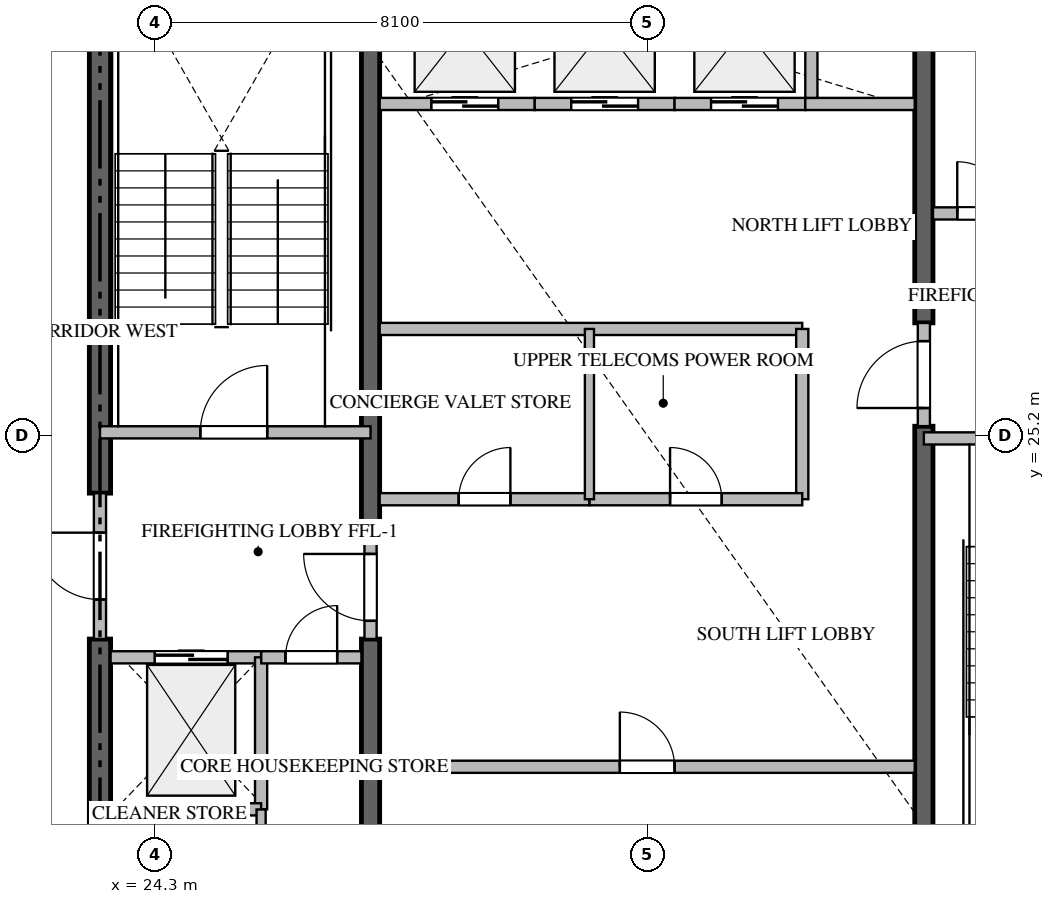
"""IFC4 building model, lengths in metres.
Left out: names, types, materials, properties, quantities, classifications, styles, units other than length and angle.
Written with IfcOpenShell. Run it as: python <this file> out.ifc"""

import sys

from ifc_helpers import new_model, si_unit, direction, frame, frame_2d, origin, place, context, subcontext, project, spatial, rectangle, extrude, source, transform, mapped, element, fill, save


model = new_model("IFC4")
c1 = context("Model", 3, precision=1e-05, world=origin(), true_north=direction((0.0, 1.0)))
c2 = subcontext(c1, "Body", "Model", "MODEL_VIEW")
j1 = project(units=[si_unit("LENGTHUNIT", "METRE"), si_unit("PLANEANGLEUNIT", "RADIAN")], contexts=[c1])
p1 = place(None, origin())
s1 = spatial("IfcSite", under=j1, at=p1, CompositionType="ELEMENT")
p2 = place(p1, origin())
s2 = spatial("IfcBuilding", under=s1, at=p2, CompositionType="ELEMENT")
p3 = place(p2, frame((0.0, 0.0, 264.35)))
s3 = spatial("IfcBuildingStorey", under=s2, at=p3, CompositionType="ELEMENT", Elevation=264.35)
p4 = place(p3, frame((23.4, 16.975, -0.26), z_axis=(0.0, 0.0, 1.0), x_axis=(0.0, 1.0, 0.0)))
e1 = element("IfcWall", 1, at=p4, inside=s3, PredefinedType="SHEAR", context=c2, shape_type="SweptSolid", body=[
    extrude(rectangle(XDim=4.875, YDim=0.35, at=frame_2d((2.438, 0.0))), origin(), (0.0, 0.0, 1.0), 3.848),
])
p5 = place(p3, frame((23.4, 24.25, -0.26), z_axis=(0.0, 0.0, 1.0), x_axis=(0.0, 1.0, 0.0)))
e2 = element("IfcWall", 2, at=p5, inside=s3, PredefinedType="SHEAR", context=c2, shape_type="SweptSolid", body=[
    extrude(rectangle(XDim=9.175, YDim=0.35, at=frame_2d((4.587, 0.0))), origin(), (0.0, 0.0, 1.0), 3.848),
])
p6 = place(p3, frame((27.85, 16.975, -0.26), z_axis=(0.0, 0.0, 1.0), x_axis=(0.0, 1.0, 0.0)))
e3 = element("IfcWall", 3, at=p6, inside=s3, PredefinedType="SHEAR", context=c2, shape_type="SweptSolid", body=[
    extrude(rectangle(XDim=4.875, YDim=0.3, at=frame_2d((2.438, 0.0))), origin(), (0.0, 0.0, 1.0), 3.848),
])
p7 = place(p3, frame((27.85, 23.55, -0.26), z_axis=(0.0, 0.0, 1.0), x_axis=(0.0, 1.0, 0.0)))
e4 = element("IfcWall", 4, at=p7, inside=s3, PredefinedType="SHEAR", context=c2, shape_type="SweptSolid", body=[
    extrude(rectangle(XDim=9.875, YDim=0.3, at=frame_2d((4.938, 0.0))), origin(), (0.0, 0.0, 1.0), 3.848),
])
p8 = place(p3, frame((36.95, 16.975, -0.26), z_axis=(0.0, 0.0, 1.0), x_axis=(0.0, 1.0, 0.0)))
e5 = element("IfcWall", 5, at=p8, inside=s3, PredefinedType="SHEAR", context=c2, shape_type="SweptSolid", body=[
    extrude(rectangle(XDim=8.375, YDim=0.3, at=frame_2d((4.188, 0.0))), origin(), (0.0, 0.0, 1.0), 3.848),
])
p9 = place(p3, frame((36.95, 27.05, -0.26), z_axis=(0.0, 0.0, 1.0), x_axis=(0.0, 1.0, 0.0)))
e6 = element("IfcWall", 6, at=p9, inside=s3, PredefinedType="SHEAR", context=c2, shape_type="SweptSolid", body=[
    extrude(rectangle(XDim=6.375, YDim=0.3, at=frame_2d((3.188, 0.0))), origin(), (0.0, 0.0, 1.0), 3.848),
])
p10 = place(p3, frame((23.4, 25.25, 0.0), z_axis=(0.0, 0.0, 1.0), x_axis=(1.0, 0.0, 0.0)))
e7 = element("IfcWall", 7, at=p10, inside=s3, PredefinedType="STANDARD", context=c2, shape_type="SweptSolid", body=[
    extrude(rectangle(XDim=4.45, YDim=0.2, at=frame_2d((2.225, 0.0))), origin(), (0.0, 0.0, 1.0), 3.59),
])
p11 = place(p10, frame((1.65, 0.0, 0.0)))
e8 = element("IfcOpeningElement", 8, at=p11, cuts=e7, PredefinedType="OPENING", context=c2, shape_type="SweptSolid", body=[
    extrude(rectangle(XDim=1.1, YDim=2.15, at=frame_2d((0.55, 1.075))), frame((0.0, 0.11, 0.0), z_axis=(0.0, -1.0, 0.0), x_axis=(1.0, 0.0, 0.0)), (0.0, 0.0, 1.0), 0.22),
])
p12 = place(p3, frame((36.95, 25.15, 0.0), z_axis=(0.0, 0.0, 1.0), x_axis=(1.0, 0.0, 0.0)))
e9 = element("IfcWall", 9, at=p12, inside=s3, PredefinedType="STANDARD", context=c2, shape_type="SweptSolid", body=[
    extrude(rectangle(XDim=4.45, YDim=0.2, at=frame_2d((2.225, 0.0))), origin(), (0.0, 0.0, 1.0), 3.59),
])
p13 = place(p12, frame((1.65, 0.0, 0.0)))
e10 = element("IfcOpeningElement", 10, at=p13, cuts=e9, PredefinedType="OPENING", context=c2, shape_type="SweptSolid", body=[
    extrude(rectangle(XDim=1.1, YDim=2.15, at=frame_2d((0.55, 1.075))), frame((0.0, 0.11, 0.0), z_axis=(0.0, -1.0, 0.0), x_axis=(1.0, 0.0, 0.0)), (0.0, 0.0, 1.0), 0.22),
])
p14 = place(p3, frame((23.575, 21.55, 0.0), z_axis=(0.0, 0.0, 1.0), x_axis=(1.0, 0.0, 0.0)))
e11 = element("IfcWall", 11, at=p14, inside=s3, PredefinedType="STANDARD", context=c2, shape_type="SweptSolid", body=[
    extrude(rectangle(XDim=2.475, YDim=0.2, at=frame_2d((1.238, 0.0))), origin(), (0.0, 0.0, 1.0), 3.59),
])
p15 = place(p14, frame((0.725, 0.0, 0.0)))
e12 = element("IfcOpeningElement", 12, at=p15, cuts=e11, PredefinedType="OPENING", context=c2, shape_type="SweptSolid", body=[
    extrude(rectangle(XDim=1.2, YDim=2.2, at=frame_2d((0.6, 1.1))), frame((0.0, 0.11, 0.0), z_axis=(0.0, -1.0, 0.0), x_axis=(1.0, 0.0, 0.0)), (0.0, 0.0, 1.0), 0.22),
])
p16 = place(p3, frame((28.0, 30.65, 0.0), z_axis=(0.0, 0.0, 1.0), x_axis=(1.0, 0.0, 0.0)))
e13 = element("IfcWall", 13, at=p16, inside=s3, PredefinedType="STANDARD", context=c2, shape_type="SweptSolid", body=[
    extrude(rectangle(XDim=2.55, YDim=0.2, at=frame_2d((1.275, 0.0))), origin(), (0.0, 0.0, 1.0), 3.59),
])
p17 = place(p16, frame((0.85, 0.0, 0.0)))
e14 = element("IfcOpeningElement", 14, at=p17, cuts=e13, PredefinedType="OPENING", context=c2, shape_type="SweptSolid", body=[
    extrude(rectangle(XDim=1.1, YDim=2.2, at=frame_2d((0.55, 1.1))), frame((0.0, 0.11, 0.0), z_axis=(0.0, -1.0, 0.0), x_axis=(1.0, 0.0, 0.0)), (0.0, 0.0, 1.0), 0.22),
])
p18 = place(p3, frame((30.55, 30.65, 0.0), z_axis=(0.0, 0.0, 1.0), x_axis=(1.0, 0.0, 0.0)))
e15 = element("IfcWall", 15, at=p18, inside=s3, PredefinedType="STANDARD", context=c2, shape_type="SweptSolid", body=[
    extrude(rectangle(XDim=2.3, YDim=0.2, at=frame_2d((1.15, 0.0))), origin(), (0.0, 0.0, 1.0), 3.59),
])
p19 = place(p18, frame((0.6, 0.0, 0.0)))
e16 = element("IfcOpeningElement", 16, at=p19, cuts=e15, PredefinedType="OPENING", context=c2, shape_type="SweptSolid", body=[
    extrude(rectangle(XDim=1.1, YDim=2.2, at=frame_2d((0.55, 1.1))), frame((0.0, 0.11, 0.0), z_axis=(0.0, -1.0, 0.0), x_axis=(1.0, 0.0, 0.0)), (0.0, 0.0, 1.0), 0.22),
])
p20 = place(p3, frame((32.85, 30.65, 0.0), z_axis=(0.0, 0.0, 1.0), x_axis=(1.0, 0.0, 0.0)))
e17 = element("IfcWall", 17, at=p20, inside=s3, PredefinedType="STANDARD", context=c2, shape_type="SweptSolid", body=[
    extrude(rectangle(XDim=2.15, YDim=0.2, at=frame_2d((1.075, 0.0))), origin(), (0.0, 0.0, 1.0), 3.59),
])
p21 = place(p20, frame((0.6, 0.0, 0.0)))
e18 = element("IfcOpeningElement", 18, at=p21, cuts=e17, PredefinedType="OPENING", context=c2, shape_type="SweptSolid", body=[
    extrude(rectangle(XDim=1.1, YDim=2.2, at=frame_2d((0.55, 1.1))), frame((0.0, 0.11, 0.0), z_axis=(0.0, -1.0, 0.0), x_axis=(1.0, 0.0, 0.0)), (0.0, 0.0, 1.0), 0.22),
])
p22 = place(p3, frame((35.0, 30.65, 0.0), z_axis=(0.0, 0.0, 1.0), x_axis=(1.0, 0.0, 0.0)))
e19 = element("IfcWall", 19, at=p22, inside=s3, PredefinedType="STANDARD", context=c2, shape_type="SweptSolid", body=[
    extrude(rectangle(XDim=1.8, YDim=0.2, at=frame_2d((0.9, 0.0))), origin(), (0.0, 0.0, 1.0), 3.59),
])
p23 = place(p3, frame((35.1, 30.75, 0.0), z_axis=(0.0, 0.0, 1.0), x_axis=(0.0, 1.0, 0.0)))
e20 = element("IfcWall", 20, at=p23, inside=s3, PredefinedType="STANDARD", context=c2, shape_type="SweptSolid", body=[
    extrude(rectangle(XDim=2.675, YDim=0.2, at=frame_2d((1.337, 0.0))), origin(), (0.0, 0.0, 1.0), 3.59),
])
p24 = place(p3, frame((26.05, 19.05, 0.0), z_axis=(0.0, 0.0, 1.0), x_axis=(0.0, 1.0, 0.0)))
e21 = element("IfcWall", 21, at=p24, inside=s3, PredefinedType="STANDARD", context=c2, shape_type="SweptSolid", body=[
    extrude(rectangle(XDim=2.5, YDim=0.2, at=frame_2d((1.25, 0.0))), origin(), (0.0, 0.0, 1.0), 3.59),
])
p25 = place(p3, frame((23.575, 19.05, 0.0), z_axis=(0.0, 0.0, 1.0), x_axis=(1.0, 0.0, 0.0)))
e22 = element("IfcWall", 22, at=p25, inside=s3, PredefinedType="STANDARD", context=c2, shape_type="SweptSolid", body=[
    extrude(rectangle(XDim=2.475, YDim=0.2, at=frame_2d((1.238, 0.0))), origin(), (0.0, 0.0, 1.0), 3.59),
])
p26 = place(p3, frame((26.052, 21.55, 0.0), z_axis=(0.0, 0.0, 1.0), x_axis=(1.0, 0.0, 0.0)))
e23 = element("IfcWall", 23, at=p26, inside=s3, PredefinedType="STANDARD", context=c2, shape_type="SweptSolid", body=[
    extrude(rectangle(XDim=1.648, YDim=0.2, at=frame_2d((0.824, 0.0))), origin(), (0.0, 0.0, 1.0), 3.59),
])
p27 = place(p26, frame((0.399, 0.0, 0.0)))
e24 = element("IfcOpeningElement", 24, at=p27, cuts=e23, PredefinedType="OPENING", context=c2, shape_type="SweptSolid", body=[
    extrude(rectangle(XDim=0.85, YDim=2.1, at=frame_2d((0.425, 1.05))), frame((0.0, 0.11, 0.0), z_axis=(0.0, -1.0, 0.0), x_axis=(1.0, 0.0, 0.0)), (0.0, 0.0, 1.0), 0.22),
])
p28 = place(p3, frame((37.1, 28.85, 0.0), z_axis=(0.0, 0.0, 1.0), x_axis=(1.0, 0.0, 0.0)))
e25 = element("IfcWall", 25, at=p28, inside=s3, PredefinedType="STANDARD", context=c2, shape_type="SweptSolid", body=[
    extrude(rectangle(XDim=1.648, YDim=0.2, at=frame_2d((0.824, 0.0))), origin(), (0.0, 0.0, 1.0), 3.59),
])
p29 = place(p28, frame((0.399, 0.0, 0.0)))
e26 = element("IfcOpeningElement", 26, at=p29, cuts=e25, PredefinedType="OPENING", context=c2, shape_type="SweptSolid", body=[
    extrude(rectangle(XDim=0.85, YDim=2.1, at=frame_2d((0.425, 1.05))), frame((0.0, 0.11, 0.0), z_axis=(0.0, -1.0, 0.0), x_axis=(1.0, 0.0, 0.0)), (0.0, 0.0, 1.0), 0.22),
])
p30 = place(p3, frame((23.4, 21.852, 0.0), z_axis=(0.0, 0.0, 1.0), x_axis=(0.0, 1.0, 0.0)))
e27 = element("IfcWall", 27, at=p30, inside=s3, PredefinedType="STANDARD", context=c2, shape_type="SweptSolid", body=[
    extrude(rectangle(XDim=2.396, YDim=0.2, at=frame_2d((1.198, 0.0))), origin(), (0.0, 0.0, 1.0), 3.59),
])
p31 = place(p30, frame((0.648, 0.0, 0.0)))
e28 = element("IfcOpeningElement", 28, at=p31, cuts=e27, PredefinedType="OPENING", context=c2, shape_type="SweptSolid", body=[
    extrude(rectangle(XDim=1.1, YDim=2.15, at=frame_2d((0.55, 1.075))), frame((0.0, 0.11, 0.0), z_axis=(0.0, -1.0, 0.0), x_axis=(1.0, 0.0, 0.0)), (0.0, 0.0, 1.0), 0.22),
])
p32 = place(p3, frame((27.85, 21.852, 0.0), z_axis=(0.0, 0.0, 1.0), x_axis=(0.0, 1.0, 0.0)))
e29 = element("IfcWall", 29, at=p32, inside=s3, PredefinedType="STANDARD", context=c2, shape_type="SweptSolid", body=[
    extrude(rectangle(XDim=1.696, YDim=0.2, at=frame_2d((0.848, 0.0))), origin(), (0.0, 0.0, 1.0), 3.59),
])
p33 = place(p32, frame((0.298, 0.0, 0.0)))
e30 = element("IfcOpeningElement", 30, at=p33, cuts=e29, PredefinedType="OPENING", context=c2, shape_type="SweptSolid", body=[
    extrude(rectangle(XDim=1.1, YDim=2.15, at=frame_2d((0.55, 1.075))), frame((0.0, 0.11, 0.0), z_axis=(0.0, -1.0, 0.0), x_axis=(1.0, 0.0, 0.0)), (0.0, 0.0, 1.0), 0.22),
])
p34 = place(p3, frame((36.95, 25.352, 0.0), z_axis=(0.0, 0.0, 1.0), x_axis=(0.0, 1.0, 0.0)))
e31 = element("IfcWall", 31, at=p34, inside=s3, PredefinedType="STANDARD", context=c2, shape_type="SweptSolid", body=[
    extrude(rectangle(XDim=1.696, YDim=0.2, at=frame_2d((0.848, 0.0))), origin(), (0.0, 0.0, 1.0), 3.59),
])
p35 = place(p34, frame((0.298, 0.0, 0.0)))
e32 = element("IfcOpeningElement", 32, at=p35, cuts=e31, PredefinedType="OPENING", context=c2, shape_type="SweptSolid", body=[
    extrude(rectangle(XDim=1.1, YDim=2.15, at=frame_2d((0.55, 1.075))), frame((0.0, 0.11, 0.0), z_axis=(0.0, -1.0, 0.0), x_axis=(1.0, 0.0, 0.0)), (0.0, 0.0, 1.0), 0.22),
])
p36 = place(p3, frame((26.05, 16.975, 0.0), z_axis=(0.0, 0.0, 1.0), x_axis=(0.0, 1.0, 0.0)))
e33 = element("IfcWall", 33, at=p36, inside=s3, PredefinedType="PARTITIONING", context=c2, shape_type="SweptSolid", body=[
    extrude(rectangle(XDim=2.073, YDim=0.15, at=frame_2d((1.037, 0.0))), origin(), (0.0, 0.0, 1.0), 3.59),
])
p37 = place(p36, frame((0.611, 0.0, 0.0)))
e34 = element("IfcOpeningElement", 34, at=p37, cuts=e33, PredefinedType="OPENING", context=c2, shape_type="SweptSolid", body=[
    extrude(rectangle(XDim=0.85, YDim=2.1, at=frame_2d((0.425, 1.05))), frame((0.0, 0.085, 0.0), z_axis=(0.0, -1.0, 0.0), x_axis=(1.0, 0.0, 0.0)), (0.0, 0.0, 1.0), 0.17),
])
p38 = place(p3, frame((28.0, 19.75, 0.0), z_axis=(0.0, 0.0, 1.0), x_axis=(1.0, 0.0, 0.0)))
e35 = element("IfcWall", 35, at=p38, inside=s3, PredefinedType="STANDARD", context=c2, shape_type="SweptSolid", body=[
    extrude(rectangle(XDim=8.8, YDim=0.2, at=frame_2d((4.4, 0.0))), origin(), (0.0, 0.0, 1.0), 3.59),
])
p39 = place(p38, frame((3.95, 0.0, 0.0)))
e36 = element("IfcOpeningElement", 36, at=p39, cuts=e35, PredefinedType="OPENING", context=c2, shape_type="SweptSolid", body=[
    extrude(rectangle(XDim=0.9, YDim=2.1, at=frame_2d((0.45, 1.05))), frame((0.0, 0.11, 0.0), z_axis=(0.0, -1.0, 0.0), x_axis=(1.0, 0.0, 0.0)), (0.0, 0.0, 1.0), 0.22),
])
p40 = place(p3, frame((28.0, 26.95, 0.0), z_axis=(0.0, 0.0, 1.0), x_axis=(1.0, 0.0, 0.0)))
e37 = element("IfcWall", 37, at=p40, inside=s3, PredefinedType="STANDARD", context=c2, shape_type="SweptSolid", body=[
    extrude(rectangle(XDim=6.95, YDim=0.2, at=frame_2d((3.475, 0.0))), origin(), (0.0, 0.0, 1.0), 3.59),
])
p41 = place(p3, frame((34.95, 24.15, 0.0), z_axis=(0.0, 0.0, 1.0), x_axis=(0.0, 1.0, 0.0)))
e38 = element("IfcWall", 38, at=p41, inside=s3, PredefinedType="STANDARD", context=c2, shape_type="SweptSolid", body=[
    extrude(rectangle(XDim=2.8, YDim=0.2, at=frame_2d((1.4, 0.0))), origin(), (0.0, 0.0, 1.0), 3.59),
])
p42 = place(p3, frame((28.0, 24.15, 0.0), z_axis=(0.0, 0.0, 1.0), x_axis=(1.0, 0.0, 0.0)))
e39 = element("IfcWall", 39, at=p42, inside=s3, PredefinedType="STANDARD", context=c2, shape_type="SweptSolid", body=[
    extrude(rectangle(XDim=3.45, YDim=0.2, at=frame_2d((1.725, 0.0))), origin(), (0.0, 0.0, 1.0), 3.59),
])
p43 = place(p42, frame((1.3, 0.0, 0.0)))
e40 = element("IfcOpeningElement", 40, at=p43, cuts=e39, PredefinedType="OPENING", context=c2, shape_type="SweptSolid", body=[
    extrude(rectangle(XDim=0.85, YDim=2.1, at=frame_2d((0.425, 1.05))), frame((0.0, 0.11, 0.0), z_axis=(0.0, -1.0, 0.0), x_axis=(1.0, 0.0, 0.0)), (0.0, 0.0, 1.0), 0.22),
])
p44 = place(p3, frame((31.452, 24.15, 0.0), z_axis=(0.0, 0.0, 1.0), x_axis=(1.0, 0.0, 0.0)))
e41 = element("IfcWall", 41, at=p44, inside=s3, PredefinedType="STANDARD", context=c2, shape_type="SweptSolid", body=[
    extrude(rectangle(XDim=3.498, YDim=0.2, at=frame_2d((1.749, 0.0))), origin(), (0.0, 0.0, 1.0), 3.59),
])
p45 = place(p44, frame((1.324, 0.0, 0.0)))
e42 = element("IfcOpeningElement", 42, at=p45, cuts=e41, PredefinedType="OPENING", context=c2, shape_type="SweptSolid", body=[
    extrude(rectangle(XDim=0.85, YDim=2.1, at=frame_2d((0.425, 1.05))), frame((0.0, 0.11, 0.0), z_axis=(0.0, -1.0, 0.0), x_axis=(1.0, 0.0, 0.0)), (0.0, 0.0, 1.0), 0.22),
])
p46 = place(p3, frame((31.45, 24.15, 0.0), z_axis=(0.0, 0.0, 1.0), x_axis=(0.0, 1.0, 0.0)))
e43 = element("IfcWall", 43, at=p46, inside=s3, PredefinedType="PARTITIONING", context=c2, shape_type="SweptSolid", body=[
    extrude(rectangle(XDim=2.8, YDim=0.15, at=frame_2d((1.4, 0.0))), origin(), (0.0, 0.0, 1.0), 3.59),
])
m1 = source(origin(), c2, "Body", "SweptSolid", [
    extrude(rectangle(XDim=1.1, YDim=2.15, at=frame_2d((0.55, 1.075))), frame((0.0, 0.025, 0.0), z_axis=(0.0, -1.0, 0.0), x_axis=(1.0, 0.0, 0.0)), (0.0, 0.0, 1.0), 0.05),
])
p47 = place(p11, origin())
e44 = element("IfcDoor", 44, at=p47, inside=s3, OperationType="SINGLE_SWING_RIGHT", PredefinedType="DOOR", context=c2, shape_type="MappedRepresentation", body=[
    mapped(m1, transform((0.0, 0.0, 0.0), scale=1.0)),
])
fill(e8, e44)
m2 = source(origin(), c2, "Body", "SweptSolid", [
    extrude(rectangle(XDim=1.2, YDim=2.2, at=frame_2d((0.6, 1.1))), frame((0.0, 0.025, 0.0), z_axis=(0.0, -1.0, 0.0), x_axis=(1.0, 0.0, 0.0)), (0.0, 0.0, 1.0), 0.05),
])
p48 = place(p15, origin())
e45 = element("IfcDoor", 45, at=p48, inside=s3, OperationType="DOUBLE_DOOR_SLIDING", PredefinedType="DOOR", context=c2, shape_type="MappedRepresentation", body=[
    mapped(m2, transform((0.0, 0.0, 0.0), scale=1.0)),
])
fill(e12, e45)
m3 = source(origin(), c2, "Body", "SweptSolid", [
    extrude(rectangle(XDim=1.1, YDim=2.2, at=frame_2d((0.55, 1.1))), frame((0.0, 0.025, 0.0), z_axis=(0.0, -1.0, 0.0), x_axis=(1.0, 0.0, 0.0)), (0.0, 0.0, 1.0), 0.05),
])
p49 = place(p17, origin())
e46 = element("IfcDoor", 46, at=p49, inside=s3, OperationType="DOUBLE_DOOR_SLIDING", PredefinedType="DOOR", context=c2, shape_type="MappedRepresentation", body=[
    mapped(m3, transform((0.0, 0.0, 0.0), scale=1.0)),
])
fill(e14, e46)
p50 = place(p19, origin())
e47 = element("IfcDoor", 47, at=p50, inside=s3, OperationType="DOUBLE_DOOR_SLIDING", PredefinedType="DOOR", context=c2, shape_type="MappedRepresentation", body=[
    mapped(m3, transform((0.0, 0.0, 0.0), scale=1.0)),
])
fill(e16, e47)
p51 = place(p21, origin())
e48 = element("IfcDoor", 48, at=p51, inside=s3, OperationType="DOUBLE_DOOR_SLIDING", PredefinedType="DOOR", context=c2, shape_type="MappedRepresentation", body=[
    mapped(m3, transform((0.0, 0.0, 0.0), scale=1.0)),
])
fill(e18, e48)
m4 = source(origin(), c2, "Body", "SweptSolid", [
    extrude(rectangle(XDim=0.85, YDim=2.1, at=frame_2d((0.425, 1.05))), frame((0.0, 0.025, 0.0), z_axis=(0.0, -1.0, 0.0), x_axis=(1.0, 0.0, 0.0)), (0.0, 0.0, 1.0), 0.05),
])
p52 = place(p27, origin())
e49 = element("IfcDoor", 49, at=p52, inside=s3, OperationType="SINGLE_SWING_RIGHT", PredefinedType="DOOR", context=c2, shape_type="MappedRepresentation", body=[
    mapped(m4, transform((0.0, 0.0, 0.0), scale=1.0)),
])
fill(e24, e49)
p53 = place(p29, origin())
e50 = element("IfcDoor", 50, at=p53, inside=s3, OperationType="SINGLE_SWING_LEFT", PredefinedType="DOOR", context=c2, shape_type="MappedRepresentation", body=[
    mapped(m4, transform((0.0, 0.0, 0.0), scale=1.0)),
])
fill(e26, e50)
p54 = place(p31, origin())
e51 = element("IfcDoor", 51, at=p54, inside=s3, OperationType="SINGLE_SWING_RIGHT", PredefinedType="DOOR", context=c2, shape_type="MappedRepresentation", body=[
    mapped(m1, transform((0.0, 0.0, 0.0), scale=1.0)),
])
fill(e28, e51)
p55 = place(p33, origin())
e52 = element("IfcDoor", 52, at=p55, inside=s3, OperationType="SINGLE_SWING_RIGHT", PredefinedType="DOOR", context=c2, shape_type="MappedRepresentation", body=[
    mapped(m1, transform((0.0, 0.0, 0.0), scale=1.0)),
])
fill(e30, e52)
p56 = place(p35, origin())
e53 = element("IfcDoor", 53, at=p56, inside=s3, OperationType="SINGLE_SWING_LEFT", PredefinedType="DOOR", context=c2, shape_type="MappedRepresentation", body=[
    mapped(m1, transform((0.0, 0.0, 0.0), scale=1.0)),
])
fill(e32, e53)
m5 = source(origin(), c2, "Body", "SweptSolid", [
    extrude(rectangle(XDim=0.9, YDim=2.1, at=frame_2d((0.45, 1.05))), frame((0.0, 0.025, 0.0), z_axis=(0.0, -1.0, 0.0), x_axis=(1.0, 0.0, 0.0)), (0.0, 0.0, 1.0), 0.05),
])
p57 = place(p39, origin())
e54 = element("IfcDoor", 54, at=p57, inside=s3, OperationType="SINGLE_SWING_LEFT", PredefinedType="DOOR", context=c2, shape_type="MappedRepresentation", body=[
    mapped(m5, transform((0.0, 0.0, 0.0), scale=1.0)),
])
fill(e36, e54)
p58 = place(p43, origin())
e55 = element("IfcDoor", 55, at=p58, inside=s3, OperationType="SINGLE_SWING_RIGHT", PredefinedType="DOOR", context=c2, shape_type="MappedRepresentation", body=[
    mapped(m4, transform((0.0, 0.0, 0.0), scale=1.0)),
])
fill(e40, e55)
p59 = place(p45, origin())
e56 = element("IfcDoor", 56, at=p59, inside=s3, OperationType="SINGLE_SWING_LEFT", PredefinedType="DOOR", context=c2, shape_type="MappedRepresentation", body=[
    mapped(m4, transform((0.0, 0.0, 0.0), scale=1.0)),
])
fill(e42, e56)
save(model, sys.argv[1])
